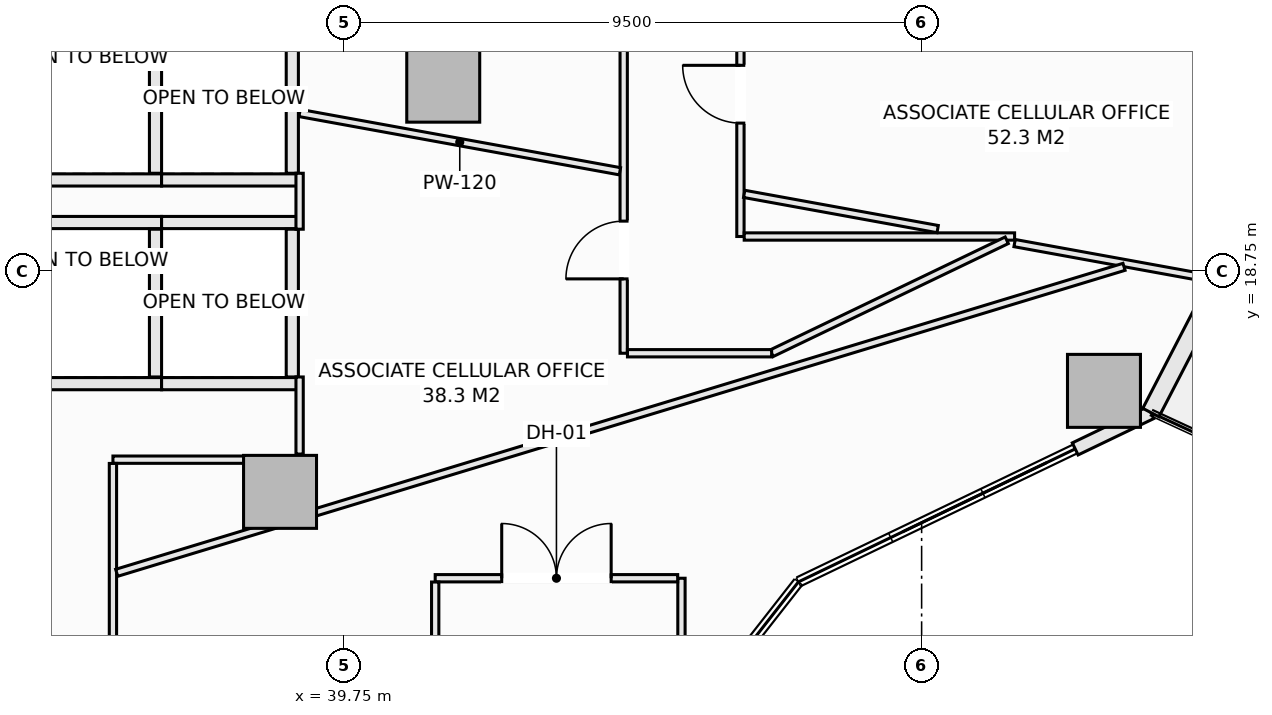
"""IFC4 building model, lengths in metres.
Left out: names, types, materials, properties, quantities, classifications, styles, units other than length and angle.
Written with IfcOpenShell. Run it as: python <this file> out.ifc"""

import sys

from ifc_helpers import new_model, si_unit, direction, frame, frame_2d, origin, origin_2d, place, context, subcontext, project, spatial, rectangle, extrude, element, fill, save


model = new_model("IFC4")
c1 = context("Model", 3, precision=1e-05, world=origin(), true_north=direction((0.0, 1.0)))
c2 = subcontext(c1, "Body", "Model", "MODEL_VIEW")
j1 = project(units=[si_unit("LENGTHUNIT", "METRE"), si_unit("PLANEANGLEUNIT", "RADIAN")], contexts=[c1])
p1 = place(None, origin())
s1 = spatial("IfcSite", under=j1, at=p1, CompositionType="ELEMENT")
p2 = place(p1, origin())
s2 = spatial("IfcBuilding", under=s1, at=p2, CompositionType="ELEMENT")
p3 = place(p2, frame((0.0, 0.0, 68.85)))
s3 = spatial("IfcBuildingStorey", under=s2, at=p3, CompositionType="ELEMENT", Elevation=68.85)
for number, where, z_axis, x_axis in (
    (1, (52.249, 16.781, -0.28), (0.0, 0.0, 1.0), (1.0, 0.0, 0.0)),
    (2, (38.698, 15.121, -0.28), (0.0, 0.0, 1.0), (1.0, 0.0, 0.0)),
    (3, (41.382, 21.801, -0.28), (0.0, 0.0, 1.0), (1.0, 0.0, 0.0)),
):
    element("IfcColumn", number, at=place(p3, frame(where, z_axis=z_axis, x_axis=x_axis)), inside=s3, PredefinedType="COLUMN", context=c2, shape_type="SweptSolid", body=[
        extrude(rectangle(XDim=1.2, YDim=1.2, at=origin_2d()), origin(), (0.0, 0.0, 1.0), 3.85),
    ])
p4 = place(p3, frame((51.776, 15.827, 0.0), z_axis=(0.0, 0.0, 1.0), x_axis=(0.90131879969, 0.433156347438, 0.0)))
e4 = element("IfcWall", 4, at=p4, inside=s3, PredefinedType="SOLIDWALL", context=c2, shape_type="SweptSolid", body=[
    extrude(rectangle(XDim=1.381, YDim=0.22, at=frame_2d((0.69, 0.0))), origin(), (0.0, 0.0, 1.0), 3.093),
])
p5 = place(p3, frame((53.021, 16.425, 0.0), z_axis=(0.0, 0.0, 1.0), x_axis=(0.459800981414, 0.888021991558, 0.0)))
e5 = element("IfcWall", 5, at=p5, inside=s3, PredefinedType="SOLIDWALL", context=c2, shape_type="SweptSolid", body=[
    extrude(rectangle(XDim=5.744, YDim=0.3, at=frame_2d((2.872, 0.0))), origin(), (0.0, 0.0, 1.0), 3.093),
])
p6 = place(p5, frame((2.85, 0.0, 0.85)))
e6 = element("IfcOpeningElement", 6, at=p6, cuts=e5, PredefinedType="OPENING", context=c2, shape_type="SweptSolid", body=[
    extrude(rectangle(XDim=2.4, YDim=1.9, at=frame_2d((1.2, 0.95))), frame((0.0, 0.16, 0.0), z_axis=(0.0, -1.0, 0.0), x_axis=(1.0, 0.0, 0.0)), (0.0, 0.0, 1.0), 0.32),
])
for number, where, z_axis, x_axis in (
    (7, (34.5, 19.55, 0.0), (0.0, 0.0, 1.0), (1.0, 0.0, 0.0)),
    (8, (34.5, 16.9, 0.0), (0.0, 0.0, 1.0), (1.0, 0.0, 0.0)),
):
    element("IfcWall", number, at=place(p3, frame(where, z_axis=z_axis, x_axis=x_axis)), inside=s3, PredefinedType="SOLIDWALL", context=c2, shape_type="SweptSolid", body=[
        extrude(rectangle(XDim=2.25, YDim=0.2, at=frame_2d((1.125, 0.0))), origin(), (0.0, 0.0, 1.0), 3.57),
    ])
p7 = place(p3, frame((36.65, 17.01, 0.0), z_axis=(0.0, 0.0, 1.0), x_axis=(0.0, 1.0, 0.0)))
e9 = element("IfcWall", 9, at=p7, inside=s3, PredefinedType="SOLIDWALL", context=c2, shape_type="SweptSolid", body=[
    extrude(rectangle(XDim=2.43, YDim=0.2, at=frame_2d((1.215, 0.0))), origin(), (0.0, 0.0, 1.0), 3.57),
])
for number, where, z_axis, x_axis in (
    (10, (36.75, 19.55, 0.0), (0.0, 0.0, 1.0), (1.0, 0.0, 0.0)),
    (11, (36.75, 16.9, 0.0), (0.0, 0.0, 1.0), (1.0, 0.0, 0.0)),
):
    element("IfcWall", number, at=place(p3, frame(where, z_axis=z_axis, x_axis=x_axis)), inside=s3, PredefinedType="SOLIDWALL", context=c2, shape_type="SweptSolid", body=[
        extrude(rectangle(XDim=2.25, YDim=0.2, at=frame_2d((1.125, 0.0))), origin(), (0.0, 0.0, 1.0), 3.57),
    ])
p8 = place(p3, frame((38.9, 17.01, 0.0), z_axis=(0.0, 0.0, 1.0), x_axis=(0.0, 1.0, 0.0)))
e12 = element("IfcWall", 12, at=p8, inside=s3, PredefinedType="SOLIDWALL", context=c2, shape_type="SweptSolid", body=[
    extrude(rectangle(XDim=2.43, YDim=0.2, at=frame_2d((1.215, 0.0))), origin(), (0.0, 0.0, 1.0), 3.57),
])
p9 = place(p3, frame((34.5, 20.25, 0.0), z_axis=(0.0, 0.0, 1.0), x_axis=(1.0, 0.0, 0.0)))
e13 = element("IfcWall", 13, at=p9, inside=s3, PredefinedType="SOLIDWALL", context=c2, shape_type="SweptSolid", body=[
    extrude(rectangle(XDim=2.25, YDim=0.2, at=frame_2d((1.125, 0.0))), origin(), (0.0, 0.0, 1.0), 3.57),
])
p10 = place(p3, frame((36.65, 20.36, 0.0), z_axis=(0.0, 0.0, 1.0), x_axis=(0.0, 1.0, 0.0)))
e14 = element("IfcWall", 14, at=p10, inside=s3, PredefinedType="SOLIDWALL", context=c2, shape_type="SweptSolid", body=[
    extrude(rectangle(XDim=2.43, YDim=0.2, at=frame_2d((1.215, 0.0))), origin(), (0.0, 0.0, 1.0), 3.57),
])
p11 = place(p3, frame((36.75, 20.25, 0.0), z_axis=(0.0, 0.0, 1.0), x_axis=(1.0, 0.0, 0.0)))
e15 = element("IfcWall", 15, at=p11, inside=s3, PredefinedType="SOLIDWALL", context=c2, shape_type="SweptSolid", body=[
    extrude(rectangle(XDim=2.25, YDim=0.2, at=frame_2d((1.125, 0.0))), origin(), (0.0, 0.0, 1.0), 3.57),
])
p12 = place(p3, frame((38.9, 20.36, 0.0), z_axis=(0.0, 0.0, 1.0), x_axis=(0.0, 1.0, 0.0)))
e16 = element("IfcWall", 16, at=p12, inside=s3, PredefinedType="SOLIDWALL", context=c2, shape_type="SweptSolid", body=[
    extrude(rectangle(XDim=2.43, YDim=0.2, at=frame_2d((1.215, 0.0))), origin(), (0.0, 0.0, 1.0), 3.57),
])
p13 = place(p3, frame((35.95, 15.65, 0.0), z_axis=(0.0, 0.0, 1.0), x_axis=(1.0, 0.0, 0.0)))
e17 = element("IfcWall", 17, at=p13, inside=s3, PredefinedType="PARTITIONING", context=c2, shape_type="SweptSolid", body=[
    extrude(rectangle(XDim=2.291, YDim=0.12, at=frame_2d((1.146, 0.0))), origin(), (0.0, 0.0, 1.0), 3.57),
])
p14 = place(p3, frame((35.95, 11.75, 0.0), z_axis=(0.0, 0.0, 1.0), x_axis=(0.0, 1.0, 0.0)))
e18 = element("IfcWall", 18, at=p14, inside=s3, PredefinedType="PARTITIONING", context=c2, shape_type="SweptSolid", body=[
    extrude(rectangle(XDim=3.838, YDim=0.12, at=frame_2d((1.919, 0.0))), origin(), (0.0, 0.0, 1.0), 3.57),
])
p15 = place(p3, frame((44.35, 17.4, 0.0), z_axis=(0.0, 0.0, 1.0), x_axis=(0.0, 1.0, 0.0)))
e19 = element("IfcWall", 19, at=p15, inside=s3, PredefinedType="PARTITIONING", context=c2, shape_type="SweptSolid", body=[
    extrude(rectangle(XDim=5.62, YDim=0.12, at=frame_2d((2.81, 0.0))), origin(), (0.0, 0.0, 1.0), 3.57),
])
p16 = place(p15, frame((1.223, 0.0, 0.0)))
e20 = element("IfcOpeningElement", 20, at=p16, cuts=e19, PredefinedType="OPENING", context=c2, shape_type="SweptSolid", body=[
    extrude(rectangle(XDim=0.95, YDim=2.1, at=frame_2d((0.475, 1.05))), frame((0.0, 0.07, 0.0), z_axis=(0.0, -1.0, 0.0), x_axis=(1.0, 0.0, 0.0)), (0.0, 0.0, 1.0), 0.14),
])
p17 = place(p3, frame((46.27, 19.32, 0.0), z_axis=(0.0, 0.0, 1.0), x_axis=(0.0, 1.0, 0.0)))
e21 = element("IfcWall", 21, at=p17, inside=s3, PredefinedType="PARTITIONING", context=c2, shape_type="SweptSolid", body=[
    extrude(rectangle(XDim=14.798, YDim=0.12, at=frame_2d((7.399, 0.0))), origin(), (0.0, 0.0, 1.0), 3.57),
])
p18 = place(p17, frame((1.865, 0.0, 0.0)))
e22 = element("IfcOpeningElement", 22, at=p18, cuts=e21, PredefinedType="OPENING", context=c2, shape_type="SweptSolid", body=[
    extrude(rectangle(XDim=0.95, YDim=2.1, at=frame_2d((0.475, 1.05))), frame((0.0, 0.07, 0.0), z_axis=(0.0, -1.0, 0.0), x_axis=(1.0, 0.0, 0.0)), (0.0, 0.0, 1.0), 0.14),
])
p19 = place(p17, frame((5.818, 0.0, 0.0)))
e23 = element("IfcOpeningElement", 23, at=p19, cuts=e21, PredefinedType="OPENING", context=c2, shape_type="SweptSolid", body=[
    extrude(rectangle(XDim=0.95, YDim=2.1, at=frame_2d((0.475, 1.05))), frame((0.0, 0.07, 0.0), z_axis=(0.0, -1.0, 0.0), x_axis=(1.0, 0.0, 0.0)), (0.0, 0.0, 1.0), 0.14),
])
p20 = place(p17, frame((10.871, 0.0, 0.0)))
e24 = element("IfcOpeningElement", 24, at=p20, cuts=e21, PredefinedType="OPENING", context=c2, shape_type="SweptSolid", body=[
    extrude(rectangle(XDim=0.95, YDim=2.1, at=frame_2d((0.475, 1.05))), frame((0.0, 0.07, 0.0), z_axis=(0.0, -1.0, 0.0), x_axis=(1.0, 0.0, 0.0)), (0.0, 0.0, 1.0), 0.14),
])
p21 = place(p3, frame((46.332, 19.32, 0.0), z_axis=(0.0, 0.0, 1.0), x_axis=(1.0, 0.0, 0.0)))
e25 = element("IfcWall", 25, at=p21, inside=s3, PredefinedType="PARTITIONING", context=c2, shape_type="SweptSolid", body=[
    extrude(rectangle(XDim=4.447, YDim=0.12, at=frame_2d((2.224, 0.0))), origin(), (0.0, 0.0, 1.0), 3.205),
])
p22 = place(p3, frame((46.783, 17.4, 0.0), z_axis=(0.0, 0.0, 1.0), x_axis=(0.901339159108, 0.433113980679, 0.0)))
e26 = element("IfcWall", 26, at=p22, inside=s3, PredefinedType="PARTITIONING", context=c2, shape_type="SweptSolid", body=[
    extrude(rectangle(XDim=4.29, YDim=0.12, at=frame_2d((2.145, 0.0))), origin(), (0.0, 0.0, 1.0), 3.57),
])
p23 = place(p3, frame((44.412, 17.4, 0.0), z_axis=(0.0, 0.0, 1.0), x_axis=(1.0, 0.0, 0.0)))
e27 = element("IfcWall", 27, at=p23, inside=s3, PredefinedType="PARTITIONING", context=c2, shape_type="SweptSolid", body=[
    extrude(rectangle(XDim=2.371, YDim=0.12, at=frame_2d((1.186, 0.0))), origin(), (0.0, 0.0, 1.0), 3.57),
])
p24 = place(p3, frame((39.02, 15.742, 0.0), z_axis=(0.0, 0.0, 1.0), x_axis=(0.0, 1.0, 0.0)))
e28 = element("IfcWall", 28, at=p24, inside=s3, PredefinedType="PARTITIONING", context=c2, shape_type="SweptSolid", body=[
    extrude(rectangle(XDim=1.268, YDim=0.12, at=frame_2d((0.634, 0.0))), origin(), (0.0, 0.0, 1.0), 2.934),
])
p25 = place(p3, frame((39.02, 19.44, 0.0), z_axis=(0.0, 0.0, 1.0), x_axis=(0.0, 1.0, 0.0)))
e29 = element("IfcWall", 29, at=p25, inside=s3, PredefinedType="PARTITIONING", context=c2, shape_type="SweptSolid", body=[
    extrude(rectangle(XDim=0.92, YDim=0.12, at=frame_2d((0.46, 0.0))), origin(), (0.0, 0.0, 1.0), 3.57),
])
p26 = place(p3, frame((39.02, 21.351, 0.0), z_axis=(0.0, 0.0, 1.0), x_axis=(0.983848017156, -0.179005807552, 0.0)))
e30 = element("IfcWall", 30, at=p26, inside=s3, PredefinedType="PARTITIONING", context=c2, shape_type="SweptSolid", body=[
    extrude(rectangle(XDim=5.354, YDim=0.12, at=frame_2d((2.677, 0.0))), origin(), (0.0, 0.0, 1.0), 3.205),
])
p27 = place(p3, frame((46.332, 20.021, 0.0), z_axis=(0.0, 0.0, 1.0), x_axis=(0.983836071263, -0.17907145189, 0.0)))
e31 = element("IfcWall", 31, at=p27, inside=s3, PredefinedType="PARTITIONING", context=c2, shape_type="SweptSolid", body=[
    extrude(rectangle(XDim=3.234, YDim=0.12, at=frame_2d((1.617, 0.0))), origin(), (0.0, 0.0, 1.0), 3.57),
])
p28 = place(p3, frame((50.779, 19.212, 0.0), z_axis=(0.0, 0.0, 1.0), x_axis=(0.983831584621, -0.179096100189, 0.0)))
e32 = element("IfcWall", 32, at=p28, inside=s3, PredefinedType="PARTITIONING", context=c2, shape_type="SweptSolid", body=[
    extrude(rectangle(XDim=3.263, YDim=0.12, at=frame_2d((1.632, 0.0))), origin(), (0.0, 0.0, 1.0), 3.57),
])
p29 = place(p3, frame((36.012, 13.79, 0.0), z_axis=(0.0, 0.0, 1.0), x_axis=(0.95683920317, 0.290617857809, 0.0)))
e33 = element("IfcWall", 33, at=p29, inside=s3, PredefinedType="PARTITIONING", context=c2, shape_type="SweptSolid", body=[
    extrude(rectangle(XDim=17.314, YDim=0.12, at=frame_2d((8.657, 0.0))), origin(), (0.0, 0.0, 1.0), 3.57),
])
p30 = place(p3, frame((45.3, 11.22, 0.0), z_axis=(0.0, 0.0, 1.0), x_axis=(0.0, 1.0, 0.0)))
e34 = element("IfcWall", 34, at=p30, inside=s3, PredefinedType="PARTITIONING", context=c2, shape_type="SweptSolid", body=[
    extrude(rectangle(XDim=2.48, YDim=0.12, at=frame_2d((1.24, 0.0))), origin(), (0.0, 0.0, 1.0), 3.57),
])
p31 = place(p3, frame((41.25, 13.7, 0.0), z_axis=(0.0, 0.0, 1.0), x_axis=(1.0, 0.0, 0.0)))
e35 = element("IfcWall", 35, at=p31, inside=s3, PredefinedType="PARTITIONING", context=c2, shape_type="SweptSolid", body=[
    extrude(rectangle(XDim=3.988, YDim=0.12, at=frame_2d((1.994, 0.0))), origin(), (0.0, 0.0, 1.0), 3.57),
])
p32 = place(p31, frame((1.094, 0.0, 0.0)))
e36 = element("IfcOpeningElement", 36, at=p32, cuts=e35, PredefinedType="OPENING", context=c2, shape_type="SweptSolid", body=[
    extrude(rectangle(XDim=1.8, YDim=2.3, at=frame_2d((0.9, 1.15))), frame((0.0, 0.07, 0.0), z_axis=(0.0, -1.0, 0.0), x_axis=(1.0, 0.0, 0.0)), (0.0, 0.0, 1.0), 0.14),
])
p33 = place(p3, frame((41.25, 10.0, 0.0), z_axis=(0.0, 0.0, 1.0), x_axis=(0.0, 1.0, 0.0)))
e37 = element("IfcWall", 37, at=p33, inside=s3, PredefinedType="PARTITIONING", context=c2, shape_type="SweptSolid", body=[
    extrude(rectangle(XDim=3.638, YDim=0.12, at=frame_2d((1.819, 0.0))), origin(), (0.0, 0.0, 1.0), 2.934),
])
p34 = place(p16, origin())
e38 = element("IfcDoor", 38, at=p34, inside=s3, OperationType="SINGLE_SWING_LEFT", PredefinedType="DOOR", context=c2, shape_type="SweptSolid", body=[
    extrude(rectangle(XDim=0.95, YDim=2.1, at=frame_2d((0.475, 1.05))), frame((0.0, 0.025, 0.0), z_axis=(0.0, -1.0, 0.0), x_axis=(1.0, 0.0, 0.0)), (0.0, 0.0, 1.0), 0.05),
])
fill(e20, e38)
p35 = place(p18, origin())
e39 = element("IfcDoor", 39, at=p35, inside=s3, OperationType="SINGLE_SWING_RIGHT", PredefinedType="DOOR", context=c2, shape_type="SweptSolid", body=[
    extrude(rectangle(XDim=0.95, YDim=2.1, at=frame_2d((0.475, 1.05))), frame((0.0, 0.025, 0.0), z_axis=(0.0, -1.0, 0.0), x_axis=(1.0, 0.0, 0.0)), (0.0, 0.0, 1.0), 0.05),
])
fill(e22, e39)
p36 = place(p32, origin())
e40 = element("IfcDoor", 40, at=p36, inside=s3, OperationType="DOUBLE_DOOR_SINGLE_SWING", PredefinedType="DOOR", context=c2, shape_type="SweptSolid", body=[
    extrude(rectangle(XDim=1.8, YDim=2.3, at=frame_2d((0.9, 1.15))), frame((0.0, 0.025, 0.0), z_axis=(0.0, -1.0, 0.0), x_axis=(1.0, 0.0, 0.0)), (0.0, 0.0, 1.0), 0.05),
])
fill(e36, e40)
save(model, sys.argv[1])
